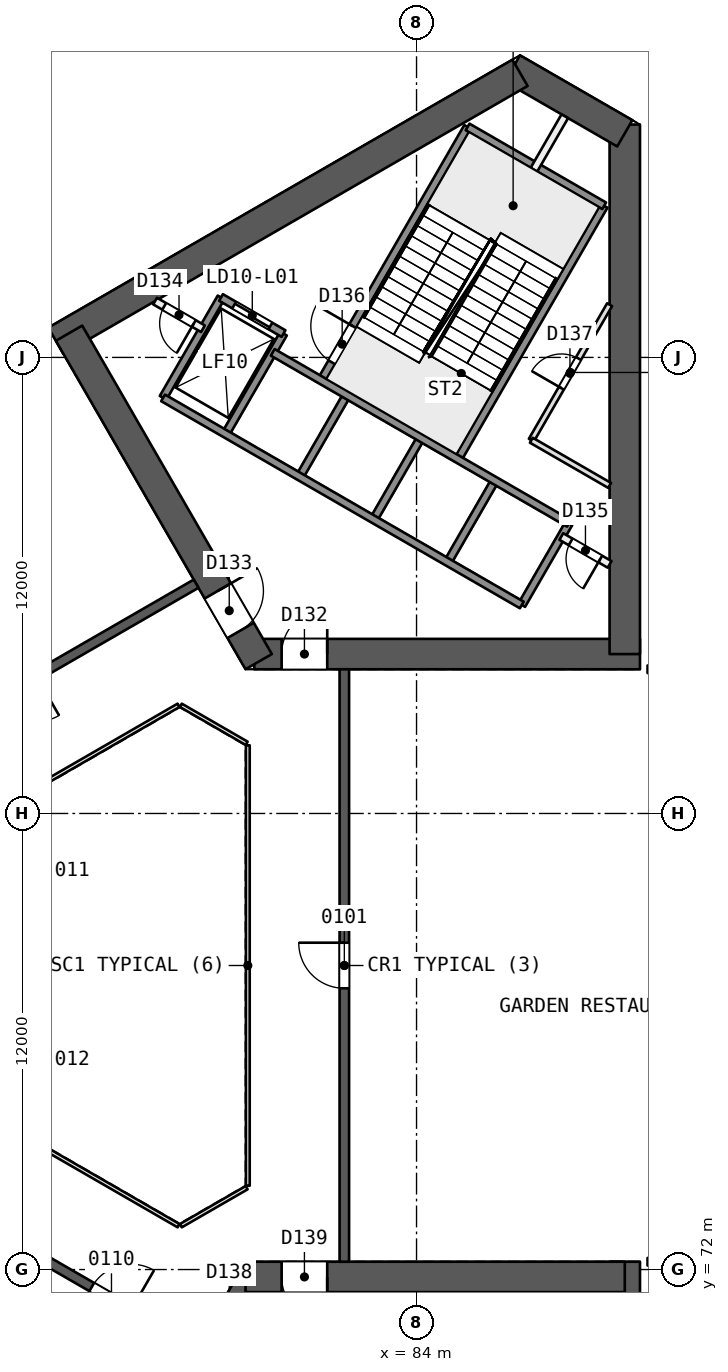
"""IFC4 building model, lengths in metres.
Left out: names, types, materials, properties, quantities, classifications, styles, units other than length and angle.
Written with IfcOpenShell. Run it as: python <this file> out.ifc"""

import sys

from ifc_helpers import new_model, si_unit, direction, frame, frame_2d, origin, place, context, subcontext, project, spatial, rectangle, extrude, element, fill, save


model = new_model("IFC4")
c1 = context("Model", 3, precision=1e-05, world=origin(), true_north=direction((0.0, 1.0)))
c2 = subcontext(c1, "Body", "Model", "MODEL_VIEW")
j1 = project(units=[si_unit("LENGTHUNIT", "METRE"), si_unit("PLANEANGLEUNIT", "RADIAN")], contexts=[c1])
p1 = place(None, origin())
s1 = spatial("IfcSite", under=j1, at=p1, CompositionType="ELEMENT")
p2 = place(p1, origin())
s2 = spatial("IfcBuilding", under=s1, at=p2, CompositionType="ELEMENT")
p3 = place(p2, frame((0.0, 0.0, 9.0)))
s3 = spatial("IfcBuildingStorey", under=s2, at=p3, CompositionType="ELEMENT", Elevation=9.0)
p4 = place(p3, frame((79.731, 88.194, 0.0), z_axis=(0.0, 0.0, 1.0), x_axis=(1.0, 0.0, 0.0)))
e1 = element("IfcWall", 1, at=p4, inside=s3, PredefinedType="SHEAR", context=c2, shape_type="SweptSolid", body=[
    extrude(rectangle(XDim=10.149, YDim=0.8, at=frame_2d((5.074, 0.0))), origin(), (0.0, 0.0, 1.0), 6.0),
])
p5 = place(p4, frame((0.719, 0.0, 0.0)))
e2 = element("IfcOpeningElement", 2, at=p5, cuts=e1, PredefinedType="OPENING", context=c2, shape_type="SweptSolid", body=[
    extrude(rectangle(XDim=1.2, YDim=2.1, at=frame_2d((0.6, 1.05))), frame((0.0, 0.411, 0.0), z_axis=(0.0, -1.0, 0.0), x_axis=(1.0, 0.0, 0.0)), (0.0, 0.0, 1.0), 0.821),
])
p6 = place(p3, frame((89.48, 88.194, 0.0), z_axis=(0.0, 0.0, 1.0), x_axis=(0.0, 1.0, 0.0)))
e3 = element("IfcWall", 3, at=p6, inside=s3, PredefinedType="SHEAR", context=c2, shape_type="SweptSolid", body=[
    extrude(rectangle(XDim=13.933, YDim=0.8, at=frame_2d((6.967, 0.0))), origin(), (0.0, 0.0, 1.0), 6.0),
])
p7 = place(p3, frame((89.48, 101.897, 0.0), z_axis=(0.0, 0.0, 1.0), x_axis=(-0.866034355626, 0.499984494636, 0.0)))
e4 = element("IfcWall", 4, at=p7, inside=s3, PredefinedType="SHEAR", context=c2, shape_type="SweptSolid", body=[
    extrude(rectangle(XDim=3.414, YDim=0.8, at=frame_2d((1.707, 0.0))), origin(), (0.0, 0.0, 1.0), 6.0),
])
p8 = place(p3, frame((86.723, 103.488, 0.0), z_axis=(0.0, 0.0, 1.0), x_axis=(-0.866032504327, -0.499987701298, 0.0)))
e5 = element("IfcWall", 5, at=p8, inside=s3, PredefinedType="SHEAR", context=c2, shape_type="SweptSolid", body=[
    extrude(rectangle(XDim=14.102, YDim=0.8, at=frame_2d((7.051, 0.0))), origin(), (0.0, 0.0, 1.0), 6.0),
])
p9 = place(p3, frame((74.856, 96.637, 0.0), z_axis=(0.0, 0.0, 1.0), x_axis=(0.499993500917, -0.866029155999, 0.0)))
e6 = element("IfcWall", 6, at=p9, inside=s3, PredefinedType="SHEAR", context=c2, shape_type="SweptSolid", body=[
    extrude(rectangle(XDim=9.98, YDim=0.8, at=frame_2d((4.99, 0.0))), origin(), (0.0, 0.0, 1.0), 6.0),
])
p10 = place(p9, frame((7.83, 0.0, 0.0)))
e7 = element("IfcOpeningElement", 7, at=p10, cuts=e6, PredefinedType="OPENING", context=c2, shape_type="SweptSolid", body=[
    extrude(rectangle(XDim=1.2, YDim=2.1, at=frame_2d((0.6, 1.05))), frame((0.0, 0.411, 0.0), z_axis=(0.0, -1.0, 0.0), x_axis=(1.0, 0.0, 0.0)), (0.0, 0.0, 1.0), 0.821),
])
p11 = place(p3, frame((79.731, 71.806, 0.0), z_axis=(0.0, 0.0, 1.0), x_axis=(-0.49999662545, -0.866027352073, 0.0)))
e8 = element("IfcWall", 8, at=p11, inside=s3, PredefinedType="SHEAR", context=c2, shape_type="SweptSolid", body=[
    extrude(rectangle(XDim=10.149, YDim=0.8, at=frame_2d((5.074, 0.0))), origin(), (0.0, 0.0, 1.0), 6.0),
])
p12 = place(p11, frame((0.719, 0.0, 0.0)))
e9 = element("IfcOpeningElement", 9, at=p12, cuts=e8, PredefinedType="OPENING", context=c2, shape_type="SweptSolid", body=[
    extrude(rectangle(XDim=1.2, YDim=2.1, at=frame_2d((0.6, 1.05))), frame((0.0, 0.411, 0.0), z_axis=(0.0, -1.0, 0.0), x_axis=(1.0, 0.0, 0.0)), (0.0, 0.0, 1.0), 0.821),
])
p13 = place(p3, frame((89.48, 58.103, 0.0), z_axis=(0.0, 0.0, 1.0), x_axis=(0.0, 1.0, 0.0)))
e10 = element("IfcWall", 10, at=p13, inside=s3, PredefinedType="SHEAR", context=c2, shape_type="SweptSolid", body=[
    extrude(rectangle(XDim=14.103, YDim=0.8, at=frame_2d((7.051, 0.0))), origin(), (0.0, 0.0, 1.0), 6.0),
])
p14 = place(p3, frame((89.48, 71.806, 0.0), z_axis=(0.0, 0.0, 1.0), x_axis=(-1.0, 0.0, 0.0)))
e11 = element("IfcWall", 11, at=p14, inside=s3, PredefinedType="SHEAR", context=c2, shape_type="SweptSolid", body=[
    extrude(rectangle(XDim=9.98, YDim=0.8, at=frame_2d((4.99, 0.0))), origin(), (0.0, 0.0, 1.0), 6.0),
])
p15 = place(p14, frame((7.83, 0.0, 0.0)))
e12 = element("IfcOpeningElement", 12, at=p15, cuts=e11, PredefinedType="OPENING", context=c2, shape_type="SweptSolid", body=[
    extrude(rectangle(XDim=1.2, YDim=2.1, at=frame_2d((0.6, 1.05))), frame((0.0, 0.411, 0.0), z_axis=(0.0, -1.0, 0.0), x_axis=(1.0, 0.0, 0.0)), (0.0, 0.0, 1.0), 0.821),
])
p16 = place(p3, frame((82.1, 72.206, 0.0), z_axis=(0.0, 0.0, 1.0), x_axis=(0.0, 1.0, 0.0)))
e13 = element("IfcWall", 13, at=p16, inside=s3, PredefinedType="SHEAR", context=c2, shape_type="SweptSolid", body=[
    extrude(rectangle(XDim=15.588, YDim=0.25, at=frame_2d((7.794, 0.0))), origin(), (0.0, 0.0, 1.0), 5.6),
])
p17 = place(p16, frame((7.194, 0.0, 0.0)))
e14 = element("IfcOpeningElement", 14, at=p17, cuts=e13, PredefinedType="OPENING", context=c2, shape_type="SweptSolid", body=[
    extrude(rectangle(XDim=1.2, YDim=2.4, at=frame_2d((0.6, 1.2))), frame((0.0, 0.135, 0.0), z_axis=(0.0, -1.0, 0.0), x_axis=(1.0, 0.0, 0.0)), (0.0, 0.0, 1.0), 0.271),
])
p18 = place(p3, frame((78.2, 90.046, 0.0), z_axis=(0.0, 0.0, 1.0), x_axis=(-0.866026492143, -0.499998114903, 0.0)))
e15 = element("IfcWall", 15, at=p18, inside=s3, PredefinedType="SHEAR", context=c2, shape_type="SweptSolid", body=[
    extrude(rectangle(XDim=15.588, YDim=0.25, at=frame_2d((7.794, 0.0))), origin(), (0.0, 0.0, 1.0), 5.6),
])
p19 = place(p18, frame((4.856, 0.0, 0.0)))
e16 = element("IfcOpeningElement", 16, at=p19, cuts=e15, PredefinedType="OPENING", context=c2, shape_type="SweptSolid", body=[
    extrude(rectangle(XDim=1.2, YDim=2.4, at=frame_2d((0.6, 1.2))), frame((0.0, 0.135, 0.0), z_axis=(0.0, -1.0, 0.0), x_axis=(1.0, 0.0, 0.0)), (0.0, 0.0, 1.0), 0.271),
])
p20 = place(p18, frame((11.163, 0.0, 0.0)))
e17 = element("IfcOpeningElement", 17, at=p20, cuts=e15, PredefinedType="OPENING", context=c2, shape_type="SweptSolid", body=[
    extrude(rectangle(XDim=0.9, YDim=2.1, at=frame_2d((0.45, 1.05))), frame((0.0, 0.135, 0.0), z_axis=(0.0, -1.0, 0.0), x_axis=(1.0, 0.0, 0.0)), (0.0, 0.0, 1.0), 0.271),
])
p21 = place(p18, frame((12.566, 0.0, 0.0)))
e18 = element("IfcOpeningElement", 18, at=p21, cuts=e15, PredefinedType="OPENING", context=c2, shape_type="SweptSolid", body=[
    extrude(rectangle(XDim=0.9, YDim=2.1, at=frame_2d((0.45, 1.05))), frame((0.0, 0.135, 0.0), z_axis=(0.0, -1.0, 0.0), x_axis=(1.0, 0.0, 0.0)), (0.0, 0.0, 1.0), 0.271),
])
p22 = place(p18, frame((14.203, 0.0, 0.0)))
e19 = element("IfcOpeningElement", 19, at=p22, cuts=e15, PredefinedType="OPENING", context=c2, shape_type="SweptSolid", body=[
    extrude(rectangle(XDim=0.9, YDim=2.1, at=frame_2d((0.45, 1.05))), frame((0.0, 0.135, 0.0), z_axis=(0.0, -1.0, 0.0), x_axis=(1.0, 0.0, 0.0)), (0.0, 0.0, 1.0), 0.271),
])
p23 = place(p3, frame((64.7, 77.748, 0.0), z_axis=(0.0, 0.0, 1.0), x_axis=(0.866026492143, -0.499998114903, 0.0)))
e20 = element("IfcWall", 20, at=p23, inside=s3, PredefinedType="SHEAR", context=c2, shape_type="SweptSolid", body=[
    extrude(rectangle(XDim=15.588, YDim=0.25, at=frame_2d((7.794, 0.0))), origin(), (0.0, 0.0, 1.0), 5.6),
])
p24 = place(p23, frame((2.05, 0.0, 0.0)))
e21 = element("IfcOpeningElement", 21, at=p24, cuts=e20, PredefinedType="OPENING", context=c2, shape_type="SweptSolid", body=[
    extrude(rectangle(XDim=1.2, YDim=2.4, at=frame_2d((0.6, 1.2))), frame((0.0, 0.135, 0.0), z_axis=(0.0, -1.0, 0.0), x_axis=(1.0, 0.0, 0.0)), (0.0, 0.0, 1.0), 0.271),
])
p25 = place(p23, frame((7.272, 0.0, 0.0)))
e22 = element("IfcOpeningElement", 22, at=p25, cuts=e20, PredefinedType="OPENING", context=c2, shape_type="SweptSolid", body=[
    extrude(rectangle(XDim=1.2, YDim=2.4, at=frame_2d((0.6, 1.2))), frame((0.0, 0.135, 0.0), z_axis=(0.0, -1.0, 0.0), x_axis=(1.0, 0.0, 0.0)), (0.0, 0.0, 1.0), 0.271),
])
p26 = place(p23, frame((12.417, 0.0, 0.0)))
e23 = element("IfcOpeningElement", 23, at=p26, cuts=e20, PredefinedType="OPENING", context=c2, shape_type="SweptSolid", body=[
    extrude(rectangle(XDim=1.2, YDim=2.4, at=frame_2d((0.6, 1.2))), frame((0.0, 0.135, 0.0), z_axis=(0.0, -1.0, 0.0), x_axis=(1.0, 0.0, 0.0)), (0.0, 0.0, 1.0), 0.271),
])
for number, where, z_axis, x_axis in (
    (24, (95.388, 87.794, 0.0), (0.0, 0.0, 1.0), (-1.0, 0.0, 0.0)),
    (25, (90.079, 72.206, 0.0), (0.0, 0.0, 1.0), (1.0, 0.0, 0.0)),
):
    element("IfcWall", number, at=place(p3, frame(where, z_axis=z_axis, x_axis=x_axis)), inside=s3, PredefinedType="PARTITIONING", context=c2, shape_type="SweptSolid", body=[
        extrude(rectangle(XDim=5.309, YDim=0.2, at=frame_2d((2.654, 0.0))), origin(), (0.0, 0.0, 1.0), 5.6),
    ])
p27 = place(p3, frame((86.77, 89.486, 0.0), z_axis=(0.0, 0.0, 1.0), x_axis=(0.499961042966, 0.86604789447, 0.0)))
e26 = element("IfcWall", 26, at=p27, inside=s3, PredefinedType="SOLIDWALL", context=c2, shape_type="SweptSolid", body=[
    extrude(rectangle(XDim=2.48, YDim=0.2, at=frame_2d((1.24, 0.0))), origin(), (0.0, 0.0, 1.0), 5.6),
])
p28 = place(p3, frame((87.021, 93.821, 0.0), z_axis=(0.0, 0.0, 1.0), x_axis=(0.500028662945, 0.866008854593, 0.0)))
e27 = element("IfcWall", 27, at=p28, inside=s3, PredefinedType="PARTITIONING", context=c2, shape_type="SweptSolid", body=[
    extrude(rectangle(XDim=4.118, YDim=0.15, at=frame_2d((2.059, 0.0))), origin(), (0.0, 0.0, 1.0), 5.6),
])
p29 = place(p28, frame((1.582, 0.0, 0.0)))
e28 = element("IfcOpeningElement", 28, at=p29, cuts=e27, PredefinedType="OPENING", context=c2, shape_type="SweptSolid", body=[
    extrude(rectangle(XDim=0.9, YDim=2.1, at=frame_2d((0.45, 1.05))), frame((0.0, 0.085, 0.0), z_axis=(0.0, -1.0, 0.0), x_axis=(1.0, 0.0, 0.0)), (0.0, 0.0, 1.0), 0.171),
])
p30 = place(p3, frame((84.821, 90.611, 0.0), z_axis=(0.0, 0.0, 1.0), x_axis=(0.499961042966, 0.86604789447, 0.0)))
e29 = element("IfcWall", 29, at=p30, inside=s3, PredefinedType="SOLIDWALL", context=c2, shape_type="SweptSolid", body=[
    extrude(rectangle(XDim=2.48, YDim=0.2, at=frame_2d((1.24, 0.0))), origin(), (0.0, 0.0, 1.0), 5.6),
])
p31 = place(p3, frame((85.087, 93.321, 0.0), z_axis=(0.0, 0.0, 1.0), x_axis=(0.500019787375, 0.866013979237, 0.0)))
e30 = element("IfcWall", 30, at=p31, inside=s3, PredefinedType="SOLIDWALL", context=c2, shape_type="SweptSolid", body=[
    extrude(rectangle(XDim=7.7, YDim=0.2, at=frame_2d((3.85, 0.0))), origin(), (0.0, 0.0, 1.0), 5.6),
])
p32 = place(p3, frame((82.873, 91.736, 0.0), z_axis=(0.0, 0.0, 1.0), x_axis=(0.499961042966, 0.86604789447, 0.0)))
e31 = element("IfcWall", 31, at=p32, inside=s3, PredefinedType="SOLIDWALL", context=c2, shape_type="SweptSolid", body=[
    extrude(rectangle(XDim=2.48, YDim=0.2, at=frame_2d((1.24, 0.0))), origin(), (0.0, 0.0, 1.0), 5.6),
])
p33 = place(p3, frame((87.09, 100.94, 0.0), z_axis=(0.0, 0.0, 1.0), x_axis=(0.499956811548, 0.866050337213, 0.0)))
e32 = element("IfcWall", 32, at=p33, inside=s3, PredefinedType="PARTITIONING", context=c2, shape_type="SweptSolid", body=[
    extrude(rectangle(XDim=1.623, YDim=0.2, at=frame_2d((0.812, 0.0))), origin(), (0.0, 0.0, 1.0), 5.6),
])
p34 = place(p3, frame((80.924, 92.861, 0.0), z_axis=(0.0, 0.0, 1.0), x_axis=(0.499961042966, 0.86604789447, 0.0)))
e33 = element("IfcWall", 33, at=p34, inside=s3, PredefinedType="SOLIDWALL", context=c2, shape_type="SweptSolid", body=[
    extrude(rectangle(XDim=2.48, YDim=0.2, at=frame_2d((1.24, 0.0))), origin(), (0.0, 0.0, 1.0), 5.6),
])
p35 = place(p3, frame((81.493, 95.396, 0.0), z_axis=(0.0, 0.0, 1.0), x_axis=(0.500006057782, 0.866021906294, 0.0)))
e34 = element("IfcWall", 34, at=p35, inside=s3, PredefinedType="SOLIDWALL", context=c2, shape_type="SweptSolid", body=[
    extrude(rectangle(XDim=7.7, YDim=0.2, at=frame_2d((3.85, 0.0))), origin(), (0.0, 0.0, 1.0), 5.6),
])
p36 = place(p35, frame((0.55, 0.0, 0.0)))
e35 = element("IfcOpeningElement", 35, at=p36, cuts=e34, PredefinedType="OPENING", context=c2, shape_type="SweptSolid", body=[
    extrude(rectangle(XDim=1.1, YDim=2.1, at=frame_2d((0.55, 1.05))), frame((0.0, 0.11, 0.0), z_axis=(0.0, -1.0, 0.0), x_axis=(1.0, 0.0, 0.0)), (0.0, 0.0, 1.0), 0.221),
])
for number, where, z_axis, x_axis in (
    (36, (78.976, 93.986, 0.0), (0.0, 0.0, 1.0), (0.5, 0.866, 0.0)),
    (37, (77.33, 94.936, 0.0), (0.0, 0.0, 1.0), (0.5, 0.866, 0.0)),
):
    element("IfcWall", number, at=place(p3, frame(where, z_axis=z_axis, x_axis=x_axis)), inside=s3, PredefinedType="SOLIDWALL", context=c2, shape_type="SweptSolid", body=[
        extrude(rectangle(XDim=3.05, YDim=0.2, at=frame_2d((1.525, 0.0))), origin(), (0.0, 0.0, 1.0), 5.6),
    ])
p37 = place(p3, frame((86.77, 89.486, 0.0), z_axis=(0.0, 0.0, 1.0), x_axis=(-0.86601811187, 0.500012629753, 0.0)))
e38 = element("IfcWall", 38, at=p37, inside=s3, PredefinedType="SOLIDWALL", context=c2, shape_type="SweptSolid", body=[
    extrude(rectangle(XDim=10.9, YDim=0.2, at=frame_2d((5.45, 0.0))), origin(), (0.0, 0.0, 1.0), 5.6),
])
p38 = place(p3, frame((89.08, 90.554, 0.0), z_axis=(0.0, 0.0, 1.0), x_axis=(-0.866022048785, 0.500005810984, 0.0)))
e39 = element("IfcWall", 39, at=p38, inside=s3, PredefinedType="PARTITIONING", context=c2, shape_type="SweptSolid", body=[
    extrude(rectangle(XDim=1.467, YDim=0.2, at=frame_2d((0.733, 0.0))), origin(), (0.0, 0.0, 1.0), 5.6),
])
p39 = place(p38, frame((0.283, 0.0, 0.0)))
e40 = element("IfcOpeningElement", 40, at=p39, cuts=e39, PredefinedType="OPENING", context=c2, shape_type="SweptSolid", body=[
    extrude(rectangle(XDim=0.9, YDim=2.1, at=frame_2d((0.45, 1.05))), frame((0.0, 0.11, 0.0), z_axis=(0.0, -1.0, 0.0), x_axis=(1.0, 0.0, 0.0)), (0.0, 0.0, 1.0), 0.221),
])
p40 = place(p3, frame((78.38, 96.755, 0.0), z_axis=(0.0, 0.0, 1.0), x_axis=(-0.866003949776, 0.500037157592, 0.0)))
e41 = element("IfcWall", 41, at=p40, inside=s3, PredefinedType="PARTITIONING", context=c2, shape_type="SweptSolid", body=[
    extrude(rectangle(XDim=1.455, YDim=0.2, at=frame_2d((0.728, 0.0))), origin(), (0.0, 0.0, 1.0), 5.6),
])
p41 = place(p40, frame((0.278, 0.0, 0.0)))
e42 = element("IfcOpeningElement", 42, at=p41, cuts=e41, PredefinedType="OPENING", context=c2, shape_type="SweptSolid", body=[
    extrude(rectangle(XDim=0.9, YDim=2.1, at=frame_2d((0.45, 1.05))), frame((0.0, 0.11, 0.0), z_axis=(0.0, -1.0, 0.0), x_axis=(1.0, 0.0, 0.0)), (0.0, 0.0, 1.0), 0.221),
])
p42 = place(p3, frame((88.01, 91.634, 0.0), z_axis=(0.0, 0.0, 1.0), x_axis=(-0.866024315419, 0.5000018851, 0.0)))
e43 = element("IfcWall", 43, at=p42, inside=s3, PredefinedType="SOLIDWALL", context=c2, shape_type="SweptSolid", body=[
    extrude(rectangle(XDim=9.0, YDim=0.2, at=frame_2d((4.5, 0.0))), origin(), (0.0, 0.0, 1.0), 5.6),
])
p43 = place(p3, frame((80.5, 96.627, 0.0), z_axis=(0.0, 0.0, 1.0), x_axis=(-0.86601224135, 0.500022797313, 0.0)))
e44 = element("IfcWall", 44, at=p43, inside=s3, PredefinedType="SOLIDWALL", context=c2, shape_type="SweptSolid", body=[
    extrude(rectangle(XDim=1.9, YDim=0.2, at=frame_2d((0.95, 0.0))), origin(), (0.0, 0.0, 1.0), 5.6),
])
p44 = place(p43, frame((0.4, 0.0, 0.0)))
e45 = element("IfcOpeningElement", 45, at=p44, cuts=e44, PredefinedType="OPENING", context=c2, shape_type="SweptSolid", body=[
    extrude(rectangle(XDim=1.1, YDim=2.1, at=frame_2d((0.55, 1.05))), frame((0.0, 0.11, 0.0), z_axis=(0.0, -1.0, 0.0), x_axis=(1.0, 0.0, 0.0)), (0.0, 0.0, 1.0), 0.221),
])
p45 = place(p3, frame((89.08, 92.632, 0.0), z_axis=(0.0, 0.0, 1.0), x_axis=(-0.866041951395, 0.499971337603, 0.0)))
e46 = element("IfcWall", 46, at=p45, inside=s3, PredefinedType="PARTITIONING", context=c2, shape_type="SweptSolid", body=[
    extrude(rectangle(XDim=2.378, YDim=0.15, at=frame_2d((1.189, 0.0))), origin(), (0.0, 0.0, 1.0), 5.6),
])
p46 = place(p3, frame((88.937, 99.99, 0.0), z_axis=(0.0, 0.0, 1.0), x_axis=(-0.866004344652, 0.500036473714, 0.0)))
e47 = element("IfcWall", 47, at=p46, inside=s3, PredefinedType="SOLIDWALL", context=c2, shape_type="SweptSolid", body=[
    extrude(rectangle(XDim=4.15, YDim=0.2, at=frame_2d((2.075, 0.0))), origin(), (0.0, 0.0, 1.0), 5.6),
])
p47 = place(p3, frame((79.56, 74.206, 0.0), z_axis=(0.0, 0.0, 1.0), x_axis=(0.0, 1.0, 0.0)))
e48 = element("IfcWall", 48, at=p47, inside=s3, PredefinedType="PARTITIONING", context=c2, shape_type="SweptSolid", body=[
    extrude(rectangle(XDim=11.588, YDim=0.1, at=frame_2d((5.794, 0.0))), origin(), (0.0, 0.0, 1.0), 5.6),
])
p48 = place(p3, frame((79.53, 85.846, 0.0), z_axis=(0.0, 0.0, 1.0), x_axis=(-0.866041268327, 0.499972520799, 0.0)))
e49 = element("IfcWall", 49, at=p48, inside=s3, PredefinedType="PARTITIONING", context=c2, shape_type="SweptSolid", body=[
    extrude(rectangle(XDim=2.0, YDim=0.1, at=frame_2d((1.0, 0.0))), origin(), (0.0, 0.0, 1.0), 5.6),
])
for number, where, z_axis, x_axis in (
    (50, (77.738, 86.846, 0.0), (0.0, 0.0, 1.0), (-0.866, -0.5, 0.0)),
    (51, (67.702, 78.948, 0.0), (0.0, 0.0, 1.0), (0.866, -0.5, 0.0)),
):
    element("IfcWall", number, at=place(p3, frame(where, z_axis=z_axis, x_axis=x_axis)), inside=s3, PredefinedType="PARTITIONING", context=c2, shape_type="SweptSolid", body=[
        extrude(rectangle(XDim=11.588, YDim=0.1, at=frame_2d((5.794, 0.0))), origin(), (0.0, 0.0, 1.0), 5.6),
    ])
p49 = place(p3, frame((77.798, 73.154, 0.0), z_axis=(0.0, 0.0, 1.0), x_axis=(0.866041268327, 0.499972520799, 0.0)))
e52 = element("IfcWall", 52, at=p49, inside=s3, PredefinedType="PARTITIONING", context=c2, shape_type="SweptSolid", body=[
    extrude(rectangle(XDim=2.0, YDim=0.1, at=frame_2d((1.0, 0.0))), origin(), (0.0, 0.0, 1.0), 5.6),
])
p50 = place(p17, origin())
e53 = element("IfcDoor", 53, at=p50, inside=s3, OperationType="SINGLE_SWING_RIGHT", PredefinedType="NOTDEFINED", context=c2, shape_type="SweptSolid", body=[
    extrude(rectangle(XDim=1.2, YDim=2.4, at=frame_2d((0.6, 1.2))), frame((0.0, 0.025, 0.0), z_axis=(0.0, -1.0, 0.0), x_axis=(1.0, 0.0, 0.0)), (0.0, 0.0, 1.0), 0.05),
])
fill(e14, e53)
p51 = place(p26, origin())
e54 = element("IfcDoor", 54, at=p51, inside=s3, OperationType="SINGLE_SWING_RIGHT", PredefinedType="NOTDEFINED", context=c2, shape_type="SweptSolid", body=[
    extrude(rectangle(XDim=1.2, YDim=2.4, at=frame_2d((0.6, 1.2))), frame((0.0, 0.025, 0.0), z_axis=(0.0, -1.0, 0.0), x_axis=(1.0, 0.0, 0.0)), (0.0, 0.0, 1.0), 0.05),
])
fill(e23, e54)
p52 = place(p5, origin())
e55 = element("IfcDoor", 55, at=p52, inside=s3, OperationType="SINGLE_SWING_RIGHT", PredefinedType="NOTDEFINED", context=c2, shape_type="SweptSolid", body=[
    extrude(rectangle(XDim=1.2, YDim=2.1, at=frame_2d((0.6, 1.05))), frame((0.0, 0.025, 0.0), z_axis=(0.0, -1.0, 0.0), x_axis=(1.0, 0.0, 0.0)), (0.0, 0.0, 1.0), 0.05),
])
fill(e2, e55)
p53 = place(p10, origin())
e56 = element("IfcDoor", 56, at=p53, inside=s3, OperationType="SINGLE_SWING_LEFT", PredefinedType="NOTDEFINED", context=c2, shape_type="SweptSolid", body=[
    extrude(rectangle(XDim=1.2, YDim=2.1, at=frame_2d((0.6, 1.05))), frame((0.0, 0.025, 0.0), z_axis=(0.0, -1.0, 0.0), x_axis=(1.0, 0.0, 0.0)), (0.0, 0.0, 1.0), 0.05),
])
fill(e7, e56)
p54 = place(p44, origin())
e57 = element("IfcDoor", 57, at=p54, inside=s3, OperationType="SLIDING_TO_RIGHT", PredefinedType="NOTDEFINED", context=c2, shape_type="SweptSolid", body=[
    extrude(rectangle(XDim=1.1, YDim=2.1, at=frame_2d((0.55, 1.05))), frame((0.0, 0.025, 0.0), z_axis=(0.0, -1.0, 0.0), x_axis=(1.0, 0.0, 0.0)), (0.0, 0.0, 1.0), 0.05),
])
fill(e45, e57)
p55 = place(p41, origin())
e58 = element("IfcDoor", 58, at=p55, inside=s3, OperationType="SINGLE_SWING_LEFT", PredefinedType="NOTDEFINED", context=c2, shape_type="SweptSolid", body=[
    extrude(rectangle(XDim=0.9, YDim=2.1, at=frame_2d((0.45, 1.05))), frame((0.0, 0.025, 0.0), z_axis=(0.0, -1.0, 0.0), x_axis=(1.0, 0.0, 0.0)), (0.0, 0.0, 1.0), 0.05),
])
fill(e42, e58)
p56 = place(p39, origin())
e59 = element("IfcDoor", 59, at=p56, inside=s3, OperationType="SINGLE_SWING_LEFT", PredefinedType="NOTDEFINED", context=c2, shape_type="SweptSolid", body=[
    extrude(rectangle(XDim=0.9, YDim=2.1, at=frame_2d((0.45, 1.05))), frame((0.0, 0.025, 0.0), z_axis=(0.0, -1.0, 0.0), x_axis=(1.0, 0.0, 0.0)), (0.0, 0.0, 1.0), 0.05),
])
fill(e40, e59)
p57 = place(p36, origin())
e60 = element("IfcDoor", 60, at=p57, inside=s3, OperationType="SINGLE_SWING_RIGHT", PredefinedType="NOTDEFINED", context=c2, shape_type="SweptSolid", body=[
    extrude(rectangle(XDim=1.1, YDim=2.1, at=frame_2d((0.55, 1.05))), frame((0.0, 0.025, 0.0), z_axis=(0.0, -1.0, 0.0), x_axis=(1.0, 0.0, 0.0)), (0.0, 0.0, 1.0), 0.05),
])
fill(e35, e60)
p58 = place(p29, origin())
e61 = element("IfcDoor", 61, at=p58, inside=s3, OperationType="SINGLE_SWING_LEFT", PredefinedType="NOTDEFINED", context=c2, shape_type="SweptSolid", body=[
    extrude(rectangle(XDim=0.9, YDim=2.1, at=frame_2d((0.45, 1.05))), frame((0.0, 0.025, 0.0), z_axis=(0.0, -1.0, 0.0), x_axis=(1.0, 0.0, 0.0)), (0.0, 0.0, 1.0), 0.05),
])
fill(e28, e61)
p59 = place(p15, origin())
e62 = element("IfcDoor", 62, at=p59, inside=s3, OperationType="SINGLE_SWING_LEFT", PredefinedType="NOTDEFINED", context=c2, shape_type="SweptSolid", body=[
    extrude(rectangle(XDim=1.2, YDim=2.1, at=frame_2d((0.6, 1.05))), frame((0.0, 0.025, 0.0), z_axis=(0.0, -1.0, 0.0), x_axis=(1.0, 0.0, 0.0)), (0.0, 0.0, 1.0), 0.05),
])
fill(e12, e62)
save(model, sys.argv[1])
